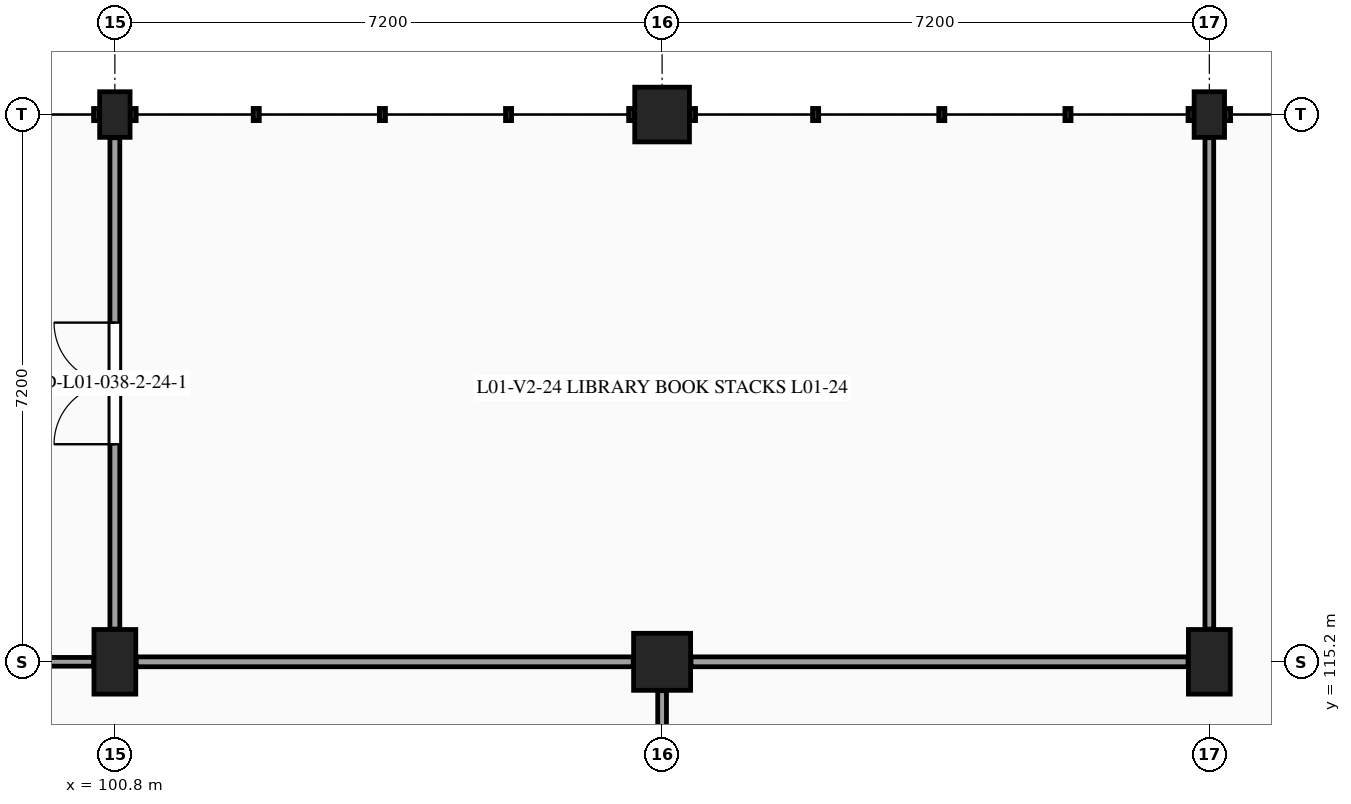
"""IFC4 building model, lengths in metres.
Left out: names, types, materials, properties, quantities, classifications, styles, units other than length and angle.
Written with IfcOpenShell. Run it as: python <this file> out.ifc"""

import sys

from ifc_helpers import new_model, si_unit, direction, frame, frame_2d, origin, origin_2d, place, context, subcontext, project, spatial, rectangle, extrude, element, fill, save


model = new_model("IFC4")
c1 = context("Model", 3, precision=1e-05, world=origin(), true_north=direction((0.0, 1.0)))
c2 = subcontext(c1, "Body", "Model", "MODEL_VIEW")
j1 = project(units=[si_unit("LENGTHUNIT", "METRE"), si_unit("PLANEANGLEUNIT", "RADIAN")], contexts=[c1])
p1 = place(None, origin())
s1 = spatial("IfcSite", under=j1, at=p1, CompositionType="ELEMENT")
p2 = place(p1, origin())
s2 = spatial("IfcBuilding", under=s1, at=p2, CompositionType="ELEMENT")
p3 = place(p2, frame((0.0, 0.0, 5.4)))
s3 = spatial("IfcBuildingStorey", under=s2, at=p3, CompositionType="ELEMENT", Elevation=5.4)
p4 = place(p3, frame((100.8, 115.2, 0.0), z_axis=(0.0, 0.0, 1.0), x_axis=(1.0, 0.0, 0.0)))
e1 = element("IfcColumn", 1, at=p4, inside=s3, PredefinedType="COLUMN", context=c2, shape_type="SweptSolid", body=[
    extrude(rectangle(XDim=0.55, YDim=0.85, at=origin_2d()), origin(), (0.0, 0.0, 1.0), 4.5),
])
p5 = place(p3, frame((100.8, 122.4, 0.0), z_axis=(0.0, 0.0, 1.0), x_axis=(1.0, 0.0, 0.0)))
e2 = element("IfcColumn", 2, at=p5, inside=s3, PredefinedType="PILASTER", context=c2, shape_type="SweptSolid", body=[
    extrude(rectangle(XDim=0.4, YDim=0.6, at=origin_2d()), origin(), (0.0, 0.0, 1.0), 4.5),
])
p6 = place(p3, frame((108.0, 115.2, 0.0), z_axis=(0.0, 0.0, 1.0), x_axis=(1.0, 0.0, 0.0)))
e3 = element("IfcColumn", 3, at=p6, inside=s3, PredefinedType="COLUMN", context=c2, shape_type="SweptSolid", body=[
    extrude(rectangle(XDim=0.75, YDim=0.75, at=origin_2d()), origin(), (0.0, 0.0, 1.0), 4.5),
])
p7 = place(p3, frame((108.0, 122.4, 0.0), z_axis=(0.0, 0.0, 1.0), x_axis=(1.0, 0.0, 0.0)))
e4 = element("IfcColumn", 4, at=p7, inside=s3, PredefinedType="COLUMN", context=c2, shape_type="SweptSolid", body=[
    extrude(rectangle(XDim=0.72, YDim=0.72, at=origin_2d()), origin(), (0.0, 0.0, 1.0), 4.5),
])
p8 = place(p3, frame((115.2, 115.2, 0.0), z_axis=(0.0, 0.0, 1.0), x_axis=(1.0, 0.0, 0.0)))
e5 = element("IfcColumn", 5, at=p8, inside=s3, PredefinedType="COLUMN", context=c2, shape_type="SweptSolid", body=[
    extrude(rectangle(XDim=0.55, YDim=0.85, at=origin_2d()), origin(), (0.0, 0.0, 1.0), 4.5),
])
p9 = place(p3, frame((115.2, 122.4, 0.0), z_axis=(0.0, 0.0, 1.0), x_axis=(1.0, 0.0, 0.0)))
e6 = element("IfcColumn", 6, at=p9, inside=s3, PredefinedType="PILASTER", context=c2, shape_type="SweptSolid", body=[
    extrude(rectangle(XDim=0.4, YDim=0.6, at=origin_2d()), origin(), (0.0, 0.0, 1.0), 4.5),
])
p10 = place(p3, frame((93.98, 115.2, 0.0), z_axis=(0.0, 0.0, 1.0), x_axis=(1.0, 0.0, 0.0)))
e7 = element("IfcWall", 7, at=p10, inside=s3, PredefinedType="PARTITIONING", context=c2, shape_type="SweptSolid", body=[
    extrude(rectangle(XDim=6.54, YDim=0.115, at=frame_2d((3.27, 0.0))), origin(), (0.0, 0.0, 1.0), 3.49),
])
p11 = place(p3, frame((100.8, 115.63, 0.0), z_axis=(0.0, 0.0, 1.0), x_axis=(0.0, 1.0, 0.0)))
e8 = element("IfcWall", 8, at=p11, inside=s3, PredefinedType="PARTITIONING", context=c2, shape_type="SweptSolid", body=[
    extrude(rectangle(XDim=6.465, YDim=0.13, at=frame_2d((3.232, 0.0))), origin(), (0.0, 0.0, 1.0), 3.52),
])
p12 = place(p11, frame((2.433, 0.0, 0.0)))
e9 = element("IfcOpeningElement", 9, at=p12, cuts=e8, PredefinedType="OPENING", context=c2, shape_type="SweptSolid", body=[
    extrude(rectangle(XDim=1.6, YDim=2.2, at=frame_2d((0.8, 1.1))), frame((0.0, 0.075, 0.0), z_axis=(0.0, -1.0, 0.0), x_axis=(1.0, 0.0, 0.0)), (0.0, 0.0, 1.0), 0.15),
])
p13 = place(p3, frame((108.0, 108.395, 0.0), z_axis=(0.0, 0.0, 1.0), x_axis=(0.0, 1.0, 0.0)))
e10 = element("IfcWall", 10, at=p13, inside=s3, PredefinedType="PARTITIONING", context=c2, shape_type="SweptSolid", body=[
    extrude(rectangle(XDim=6.425, YDim=0.115, at=frame_2d((3.212, 0.0))), origin(), (0.0, 0.0, 1.0), 3.525),
])
p14 = place(p13, frame((2.433, 0.0, 0.0)))
e11 = element("IfcOpeningElement", 11, at=p14, cuts=e10, PredefinedType="OPENING", context=c2, shape_type="SweptSolid", body=[
    extrude(rectangle(XDim=1.56, YDim=2.25, at=frame_2d((0.78, 1.125))), frame((0.0, 0.067, 0.0), z_axis=(0.0, -1.0, 0.0), x_axis=(1.0, 0.0, 0.0)), (0.0, 0.0, 1.0), 0.135),
])
p15 = place(p3, frame((101.08, 115.2, 0.0), z_axis=(0.0, 0.0, 1.0), x_axis=(1.0, 0.0, 0.0)))
e12 = element("IfcWall", 12, at=p15, inside=s3, PredefinedType="PARTITIONING", context=c2, shape_type="SweptSolid", body=[
    extrude(rectangle(XDim=6.54, YDim=0.13, at=frame_2d((3.27, 0.0))), origin(), (0.0, 0.0, 1.0), 3.51),
])
p16 = place(p3, frame((108.38, 115.2, 0.0), z_axis=(0.0, 0.0, 1.0), x_axis=(1.0, 0.0, 0.0)))
e13 = element("IfcWall", 13, at=p16, inside=s3, PredefinedType="PARTITIONING", context=c2, shape_type="SweptSolid", body=[
    extrude(rectangle(XDim=6.54, YDim=0.13, at=frame_2d((3.27, 0.0))), origin(), (0.0, 0.0, 1.0), 3.55),
])
p17 = place(p3, frame((115.2, 115.63, 0.0), z_axis=(0.0, 0.0, 1.0), x_axis=(0.0, 1.0, 0.0)))
e14 = element("IfcWall", 14, at=p17, inside=s3, PredefinedType="PARTITIONING", context=c2, shape_type="SweptSolid", body=[
    extrude(rectangle(XDim=6.465, YDim=0.115, at=frame_2d((3.232, 0.0))), origin(), (0.0, 0.0, 1.0), 3.52),
])
p18 = place(p12, origin())
e15 = element("IfcDoor", 15, at=p18, inside=s3, OperationType="DOUBLE_DOOR_SINGLE_SWING", PredefinedType="DOOR", context=c2, shape_type="SweptSolid", body=[
    extrude(rectangle(XDim=1.6, YDim=2.2, at=frame_2d((0.8, 1.1))), frame((0.0, 0.025, 0.0), z_axis=(0.0, -1.0, 0.0), x_axis=(1.0, 0.0, 0.0)), (0.0, 0.0, 1.0), 0.05),
])
fill(e9, e15)
save(model, sys.argv[1])
